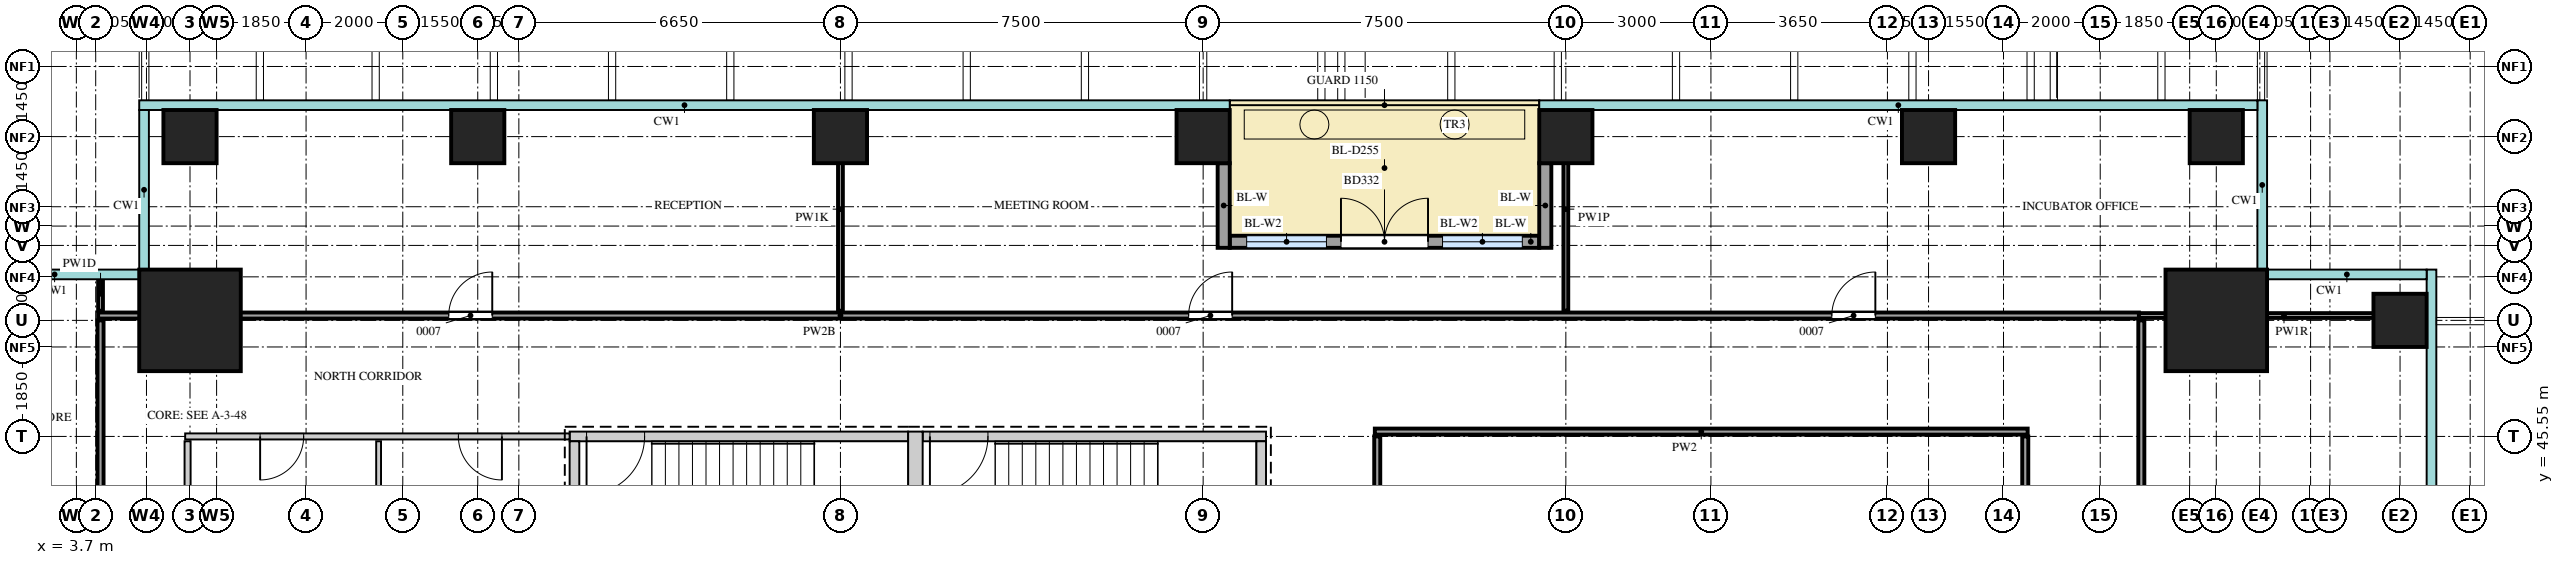
"""IFC4 building model, lengths in metres.
Left out: names, types, materials, properties, quantities, classifications, styles, units other than length and angle.
Written with IfcOpenShell. Run it as: python <this file> out.ifc"""

import sys

from ifc_helpers import new_model, si_unit, direction, frame, frame_2d, origin, origin_2d, place, context, subcontext, project, spatial, rectangle, extrude, source, transform, mapped, element, fill, save


model = new_model("IFC4")
c1 = context("Model", 3, precision=1e-05, world=origin(), true_north=direction((0.0, 1.0)))
c2 = subcontext(c1, "Body", "Model", "MODEL_VIEW")
j1 = project(units=[si_unit("LENGTHUNIT", "METRE"), si_unit("PLANEANGLEUNIT", "RADIAN")], contexts=[c1])
p1 = place(None, origin())
s1 = spatial("IfcSite", under=j1, at=p1, CompositionType="ELEMENT")
p2 = place(p1, origin())
s2 = spatial("IfcBuilding", under=s1, at=p2, CompositionType="ELEMENT")
p3 = place(p2, frame((0.0, 0.0, 154.3)))
s3 = spatial("IfcBuildingStorey", under=s2, at=p3, CompositionType="ELEMENT", Elevation=154.3)
m1 = source(origin(), c2, "Body", "SweptSolid", [
    extrude(rectangle(XDim=7.0, YDim=0.2, at=frame_2d((3.5, 0.0))), origin(), (0.0, 0.0, 1.0), 4.1),
])
p4 = place(p3, frame((13.9, 45.55, 0.0), z_axis=(0.0, 0.0, 1.0), x_axis=(1.0, 0.0, 0.0)))
e1 = element("IfcWall", 1, at=p4, inside=s3, PredefinedType="SHEAR", context=c2, shape_type="MappedRepresentation", body=[
    mapped(m1, transform((0.0, 0.0, 0.0))),
])
m2 = source(origin(), c2, "Body", "SweptSolid", [
    extrude(rectangle(XDim=1.2, YDim=2.1, at=frame_2d((0.6, 1.05))), frame((0.0, 0.11, 0.0), z_axis=(0.0, -1.0, 0.0), x_axis=(1.0, 0.0, 0.0)), (0.0, 0.0, 1.0), 0.22),
])
p5 = place(p4, frame((0.35, 0.0, 0.0)))
e2 = element("IfcOpeningElement", 2, at=p5, cuts=e1, PredefinedType="OPENING", context=c2, shape_type="MappedRepresentation", body=[
    mapped(m2, transform((0.0, 0.0, 0.0))),
])
m3 = source(origin(), c2, "Body", "SweptSolid", [
    extrude(rectangle(XDim=7.1, YDim=0.2, at=frame_2d((3.55, 0.0))), origin(), (0.0, 0.0, 1.0), 4.1),
])
p6 = place(p3, frame((21.2, 45.55, 0.0), z_axis=(0.0, 0.0, 1.0), x_axis=(1.0, 0.0, 0.0)))
e3 = element("IfcWall", 3, at=p6, inside=s3, PredefinedType="SHEAR", context=c2, shape_type="MappedRepresentation", body=[
    mapped(m3, transform((0.0, 0.0, 0.0))),
])
p7 = place(p6, frame((0.15, 0.0, 0.0)))
e4 = element("IfcOpeningElement", 4, at=p7, cuts=e3, PredefinedType="OPENING", context=c2, shape_type="MappedRepresentation", body=[
    mapped(m2, transform((0.0, 0.0, 0.0))),
])
m4 = source(origin(), c2, "Body", "SweptSolid", [
    extrude(rectangle(XDim=3.75, YDim=0.3, at=frame_2d((1.875, 0.0))), origin(), (0.0, 0.0, 1.0), 4.1),
])
p8 = place(p3, frame((21.05, 41.9, 0.0), z_axis=(0.0, 0.0, 1.0), x_axis=(0.0, 1.0, 0.0)))
e5 = element("IfcWall", 5, at=p8, inside=s3, PredefinedType="SHEAR", context=c2, shape_type="MappedRepresentation", body=[
    mapped(m4, transform((0.0, 0.0, 0.0))),
])
m5 = source(origin(), c2, "Body", "SweptSolid", [
    extrude(rectangle(XDim=3.35, YDim=0.2, at=frame_2d((1.675, 0.0))), origin(), (0.0, 0.0, 1.0), 4.1),
])
for number, where, z_axis, x_axis in (
    (6, (14.0, 42.1, 0.0), (0.0, 0.0, 1.0), (0.0, 1.0, 0.0)),
    (7, (28.2, 42.1, 0.0), (0.0, 0.0, 1.0), (0.0, 1.0, 0.0)),
):
    element("IfcWall", number, at=place(p3, frame(where, z_axis=z_axis, x_axis=x_axis)), inside=s3, PredefinedType="SHEAR", context=c2, shape_type="MappedRepresentation", body=[
        mapped(m5, transform((0.0, 0.0, 0.0))),
    ])
m6 = source(origin(), c2, "Body", "SweptSolid", [
    extrude(rectangle(XDim=2.1, YDim=2.1, at=origin_2d()), origin(), (0.0, 0.0, 1.0), 4.4),
])
for number, where, z_axis, x_axis in (
    (8, (47.95, 47.95, 0.0), (0.0, 0.0, 1.0), (1.0, 0.0, 0.0)),
    (9, (6.05, 47.95, 0.0), (0.0, 0.0, 1.0), (1.0, 0.0, 0.0)),
):
    element("IfcColumn", number, at=place(p3, frame(where, z_axis=z_axis, x_axis=x_axis)), inside=s3, PredefinedType="COLUMN", context=c2, shape_type="MappedRepresentation", body=[
        mapped(m6, transform((0.0, 0.0, 0.0))),
    ])
m7 = source(origin(), c2, "Body", "SweptSolid", [
    extrude(rectangle(XDim=1.1, YDim=1.1, at=origin_2d()), origin(), (0.0, 0.0, 1.0), 4.4),
])
for number, where, z_axis, x_axis in (
    (10, (51.75, 47.95, 0.0), (0.0, 0.0, 1.0), (1.0, 0.0, 0.0)),
    (11, (6.05, 51.75, 0.0), (0.0, 0.0, 1.0), (1.0, 0.0, 0.0)),
    (12, (12.0, 51.75, 0.0), (0.0, 0.0, 1.0), (1.0, 0.0, 0.0)),
    (13, (19.5, 51.75, 0.0), (0.0, 0.0, 1.0), (1.0, 0.0, 0.0)),
    (14, (27.0, 51.75, 0.0), (0.0, 0.0, 1.0), (1.0, 0.0, 0.0)),
    (15, (34.5, 51.75, 0.0), (0.0, 0.0, 1.0), (1.0, 0.0, 0.0)),
    (16, (42.0, 51.75, 0.0), (0.0, 0.0, 1.0), (1.0, 0.0, 0.0)),
    (17, (47.95, 51.75, 0.0), (0.0, 0.0, 1.0), (1.0, 0.0, 0.0)),
):
    element("IfcColumn", number, at=place(p3, frame(where, z_axis=z_axis, x_axis=x_axis)), inside=s3, PredefinedType="COLUMN", context=c2, shape_type="MappedRepresentation", body=[
        mapped(m7, transform((0.0, 0.0, 0.0))),
    ])
m8 = source(origin(), c2, "Body", "SweptSolid", [
    extrude(rectangle(XDim=6.4, YDim=0.25, at=frame_2d((3.2, 0.0))), origin(), (0.0, 0.0, 1.0), 4.1),
])
p9 = place(p3, frame((27.55, 49.575, 0.0), z_axis=(0.0, 0.0, 1.0), x_axis=(1.0, 0.0, 0.0)))
e18 = element("IfcWall", 18, at=p9, inside=s3, PredefinedType="SOLIDWALL", context=c2, shape_type="MappedRepresentation", body=[
    mapped(m8, transform((0.0, 0.0, 0.0))),
])
m9 = source(origin(), c2, "Body", "SweptSolid", [
    extrude(rectangle(XDim=1.65, YDim=2.4, at=frame_2d((0.825, 1.2))), frame((0.0, 0.135, 0.0), z_axis=(0.0, -1.0, 0.0), x_axis=(1.0, 0.0, 0.0)), (0.0, 0.0, 1.0), 0.27),
])
p10 = place(p9, frame((0.35, 0.0, 0.0)))
e19 = element("IfcOpeningElement", 19, at=p10, cuts=e18, PredefinedType="OPENING", context=c2, shape_type="MappedRepresentation", body=[
    mapped(m9, transform((0.0, 0.0, 0.0))),
])
p11 = place(p9, frame((4.4, 0.0, 0.0)))
e20 = element("IfcOpeningElement", 20, at=p11, cuts=e18, PredefinedType="OPENING", context=c2, shape_type="MappedRepresentation", body=[
    mapped(m9, transform((0.0, 0.0, 0.0))),
])
m10 = source(origin(), c2, "Body", "SweptSolid", [
    extrude(rectangle(XDim=1.8, YDim=2.4, at=frame_2d((0.9, 1.2))), frame((0.0, 0.135, 0.0), z_axis=(0.0, -1.0, 0.0), x_axis=(1.0, 0.0, 0.0)), (0.0, 0.0, 1.0), 0.27),
])
p12 = place(p9, frame((2.3, 0.0, 0.0)))
e21 = element("IfcOpeningElement", 21, at=p12, cuts=e18, PredefinedType="OPENING", context=c2, shape_type="MappedRepresentation", body=[
    mapped(m10, transform((0.0, 0.0, 0.0))),
])
m11 = source(origin(), c2, "Body", "SweptSolid", [
    extrude(rectangle(XDim=1.75, YDim=0.25, at=frame_2d((0.875, 0.0))), origin(), (0.0, 0.0, 1.0), 4.1),
])
for number, where, z_axis, x_axis in (
    (22, (27.425, 51.2, 0.0), (0.0, 0.0, 1.0), (0.0, -1.0, 0.0)),
    (23, (34.075, 51.2, 0.0), (0.0, 0.0, 1.0), (0.0, -1.0, 0.0)),
):
    element("IfcWall", number, at=place(p3, frame(where, z_axis=z_axis, x_axis=x_axis)), inside=s3, PredefinedType="SOLIDWALL", context=c2, shape_type="MappedRepresentation", body=[
        mapped(m11, transform((0.0, 0.0, 0.0))),
    ])
m12 = source(origin(), c2, "Body", "SweptSolid", [
    extrude(rectangle(XDim=37.65, YDim=0.125, at=frame_2d((18.825, 0.0))), origin(), (0.0, 0.0, 1.0), 4.2),
])
p13 = place(p3, frame((46.4, 10.3, 0.0), z_axis=(0.0, 0.0, 1.0), x_axis=(0.0, 1.0, 0.0)))
e24 = element("IfcWall", 24, at=p13, inside=s3, PredefinedType="PARTITIONING", context=c2, shape_type="MappedRepresentation", body=[
    mapped(m12, transform((0.0, 0.0, 0.0))),
])
m13 = source(origin(), c2, "Body", "SweptSolid", [
    extrude(rectangle(XDim=0.9, YDim=2.1, at=frame_2d((0.45, 1.05))), frame((0.0, 0.073, 0.0), z_axis=(0.0, -1.0, 0.0), x_axis=(1.0, 0.0, 0.0)), (0.0, 0.0, 1.0), 0.145),
])
p14 = place(p13, frame((7.85, 0.0, 0.0)))
e25 = element("IfcOpeningElement", 25, at=p14, cuts=e24, PredefinedType="OPENING", context=c2, shape_type="MappedRepresentation", body=[
    mapped(m13, transform((0.0, 0.0, 0.0))),
])
m14 = source(origin(), c2, "Body", "SweptSolid", [
    extrude(rectangle(XDim=1.2, YDim=2.1, at=frame_2d((0.6, 1.05))), frame((0.0, 0.073, 0.0), z_axis=(0.0, -1.0, 0.0), x_axis=(1.0, 0.0, 0.0)), (0.0, 0.0, 1.0), 0.145),
])
p15 = place(p13, frame((25.4, 0.0, 0.0)))
e26 = element("IfcOpeningElement", 26, at=p15, cuts=e24, PredefinedType="OPENING", context=c2, shape_type="MappedRepresentation", body=[
    mapped(m14, transform((0.0, 0.0, 0.0))),
])
m15 = source(origin(), c2, "Body", "SweptSolid", [
    extrude(rectangle(XDim=32.85, YDim=0.125, at=frame_2d((16.425, 0.0))), origin(), (0.0, 0.0, 1.0), 4.2),
])
p16 = place(p3, frame((44.0, 12.7, 0.0), z_axis=(0.0, 0.0, 1.0), x_axis=(0.0, 1.0, 0.0)))
e27 = element("IfcWall", 27, at=p16, inside=s3, PredefinedType="PARTITIONING", context=c2, shape_type="MappedRepresentation", body=[
    mapped(m15, transform((0.0, 0.0, 0.0))),
])
p17 = place(p16, frame((18.2, 0.0, 0.0)))
e28 = element("IfcOpeningElement", 28, at=p17, cuts=e27, PredefinedType="OPENING", context=c2, shape_type="MappedRepresentation", body=[
    mapped(m14, transform((0.0, 0.0, 0.0))),
])
p18 = place(p16, frame((27.5, 0.0, 0.0)))
e29 = element("IfcOpeningElement", 29, at=p18, cuts=e27, PredefinedType="OPENING", context=c2, shape_type="MappedRepresentation", body=[
    mapped(m14, transform((0.0, 0.0, 0.0))),
])
m16 = source(origin(), c2, "Body", "SweptSolid", [
    extrude(rectangle(XDim=28.75, YDim=0.125, at=frame_2d((14.375, 0.0))), origin(), (0.0, 0.0, 1.0), 4.2),
])
p19 = place(p3, frame((4.2, 19.2, 0.0), z_axis=(0.0, 0.0, 1.0), x_axis=(0.0, 1.0, 0.0)))
e30 = element("IfcWall", 30, at=p19, inside=s3, PredefinedType="PARTITIONING", context=c2, shape_type="MappedRepresentation", body=[
    mapped(m16, transform((0.0, 0.0, 0.0))),
])
p20 = place(p19, frame((5.95, 0.0, 0.0)))
e31 = element("IfcOpeningElement", 31, at=p20, cuts=e30, PredefinedType="OPENING", context=c2, shape_type="MappedRepresentation", body=[
    mapped(m13, transform((0.0, 0.0, 0.0))),
])
p21 = place(p19, frame((20.25, 0.0, 0.0)))
e32 = element("IfcOpeningElement", 32, at=p21, cuts=e30, PredefinedType="OPENING", context=c2, shape_type="MappedRepresentation", body=[
    mapped(m13, transform((0.0, 0.0, 0.0))),
])
m17 = source(origin(), c2, "Body", "SweptSolid", [
    extrude(rectangle(XDim=9.45, YDim=0.125, at=frame_2d((4.725, 0.0))), origin(), (0.0, 0.0, 1.0), 4.2),
])
p22 = place(p3, frame((30.6, 36.1, 0.0), z_axis=(0.0, 0.0, 1.0), x_axis=(0.0, 1.0, 0.0)))
e33 = element("IfcWall", 33, at=p22, inside=s3, PredefinedType="PARTITIONING", context=c2, shape_type="MappedRepresentation", body=[
    mapped(m17, transform((0.0, 0.0, 0.0))),
])
m18 = source(origin(), c2, "Body", "SweptSolid", [
    extrude(rectangle(XDim=3.45, YDim=0.125, at=frame_2d((1.725, 0.0))), origin(), (0.0, 0.0, 1.0), 4.2),
])
p23 = place(p3, frame((6.0, 42.0, 0.0), z_axis=(0.0, 0.0, 1.0), x_axis=(0.0, 1.0, 0.0)))
e34 = element("IfcWall", 34, at=p23, inside=s3, PredefinedType="PARTITIONING", context=c2, shape_type="MappedRepresentation", body=[
    mapped(m18, transform((0.0, 0.0, 0.0))),
])
m19 = source(origin(), c2, "Body", "SweptSolid", [
    extrude(rectangle(XDim=3.45, YDim=0.1, at=frame_2d((1.725, 0.0))), origin(), (0.0, 0.0, 1.0), 4.2),
])
p24 = place(p3, frame((9.95, 42.0, 0.0), z_axis=(0.0, 0.0, 1.0), x_axis=(0.0, 1.0, 0.0)))
e35 = element("IfcWall", 35, at=p24, inside=s3, PredefinedType="PARTITIONING", context=c2, shape_type="MappedRepresentation", body=[
    mapped(m19, transform((0.0, 0.0, 0.0))),
])
m20 = source(origin(), c2, "Body", "SweptSolid", [
    extrude(rectangle(XDim=7.95, YDim=0.125, at=frame_2d((3.975, 0.0))), origin(), (0.0, 0.0, 1.0), 4.2),
])
p25 = place(p3, frame((5.95, 45.55, 0.0), z_axis=(0.0, 0.0, 1.0), x_axis=(1.0, 0.0, 0.0)))
e36 = element("IfcWall", 36, at=p25, inside=s3, PredefinedType="PARTITIONING", context=c2, shape_type="MappedRepresentation", body=[
    mapped(m20, transform((0.0, 0.0, 0.0))),
])
p26 = place(p25, frame((1.55, 0.0, 0.0)))
e37 = element("IfcOpeningElement", 37, at=p26, cuts=e36, PredefinedType="OPENING", context=c2, shape_type="MappedRepresentation", body=[
    mapped(m13, transform((0.0, 0.0, 0.0))),
])
p27 = place(p25, frame((5.65, 0.0, 0.0)))
e38 = element("IfcOpeningElement", 38, at=p27, cuts=e36, PredefinedType="OPENING", context=c2, shape_type="MappedRepresentation", body=[
    mapped(m13, transform((0.0, 0.0, 0.0))),
])
m21 = source(origin(), c2, "Body", "SweptSolid", [
    extrude(rectangle(XDim=13.5, YDim=0.125, at=frame_2d((6.75, 0.0))), origin(), (0.0, 0.0, 1.0), 4.2),
])
p28 = place(p3, frame((30.55, 45.65, 0.0), z_axis=(0.0, 0.0, 1.0), x_axis=(1.0, 0.0, 0.0)))
e39 = element("IfcWall", 39, at=p28, inside=s3, PredefinedType="PARTITIONING", context=c2, shape_type="MappedRepresentation", body=[
    mapped(m21, transform((0.0, 0.0, 0.0))),
])
m22 = source(origin(), c2, "Body", "SweptSolid", [
    extrude(rectangle(XDim=42.2, YDim=0.125, at=frame_2d((21.1, 0.0))), origin(), (0.0, 0.0, 1.0), 3.4),
])
p29 = place(p3, frame((4.15, 48.05, 0.0), z_axis=(0.0, 0.0, 1.0), x_axis=(1.0, 0.0, 0.0)))
e40 = element("IfcWall", 40, at=p29, inside=s3, PredefinedType="PARTITIONING", context=c2, shape_type="MappedRepresentation", body=[
    mapped(m22, transform((0.0, 0.0, 0.0))),
])
p30 = place(p29, frame((7.25, 0.0, 0.0)))
e41 = element("IfcOpeningElement", 41, at=p30, cuts=e40, PredefinedType="OPENING", context=c2, shape_type="MappedRepresentation", body=[
    mapped(m13, transform((0.0, 0.0, 0.0))),
])
p31 = place(p29, frame((22.55, 0.0, 0.0)))
e42 = element("IfcOpeningElement", 42, at=p31, cuts=e40, PredefinedType="OPENING", context=c2, shape_type="MappedRepresentation", body=[
    mapped(m13, transform((0.0, 0.0, 0.0))),
])
p32 = place(p29, frame((35.85, 0.0, 0.0)))
e43 = element("IfcOpeningElement", 43, at=p32, cuts=e40, PredefinedType="OPENING", context=c2, shape_type="MappedRepresentation", body=[
    mapped(m13, transform((0.0, 0.0, 0.0))),
])
m23 = source(origin(), c2, "Body", "SweptSolid", [
    extrude(rectangle(XDim=6.0, YDim=0.1, at=frame_2d((3.0, 0.0))), origin(), (0.0, 0.0, 1.0), 3.4),
])
p33 = place(p3, frame((46.35, 48.05, 0.0), z_axis=(0.0, 0.0, 1.0), x_axis=(1.0, 0.0, 0.0)))
e44 = element("IfcWall", 44, at=p33, inside=s3, PredefinedType="PARTITIONING", context=c2, shape_type="MappedRepresentation", body=[
    mapped(m23, transform((0.0, 0.0, 0.0))),
])
m24 = source(origin(), c2, "Body", "SweptSolid", [
    extrude(rectangle(XDim=0.7, YDim=0.1, at=frame_2d((0.35, 0.0))), origin(), (0.0, 0.0, 1.0), 4.2),
])
p34 = place(p3, frame((4.2, 48.15, 0.0), z_axis=(0.0, 0.0, 1.0), x_axis=(0.0, 1.0, 0.0)))
e45 = element("IfcWall", 45, at=p34, inside=s3, PredefinedType="PARTITIONING", context=c2, shape_type="MappedRepresentation", body=[
    mapped(m24, transform((0.0, 0.0, 0.0))),
])
m25 = source(origin(), c2, "Body", "SweptSolid", [
    extrude(rectangle(XDim=4.2, YDim=0.1, at=frame_2d((2.1, 0.0))), origin(), (0.0, 0.0, 1.0), 3.62),
])
p35 = place(p3, frame((19.5, 48.15, 0.0), z_axis=(0.0, 0.0, 1.0), x_axis=(0.0, 1.0, 0.0)))
e46 = element("IfcWall", 46, at=p35, inside=s3, PredefinedType="PARTITIONING", context=c2, shape_type="MappedRepresentation", body=[
    mapped(m25, transform((0.0, 0.0, 0.0))),
])
m26 = source(origin(), c2, "Body", "SweptSolid", [
    extrude(rectangle(XDim=4.2, YDim=0.1, at=frame_2d((2.1, 0.0))), origin(), (0.0, 0.0, 1.0), 3.45),
])
p36 = place(p3, frame((34.5, 48.15, 0.0), z_axis=(0.0, 0.0, 1.0), x_axis=(0.0, 1.0, 0.0)))
e47 = element("IfcWall", 47, at=p36, inside=s3, PredefinedType="PARTITIONING", context=c2, shape_type="MappedRepresentation", body=[
    mapped(m26, transform((0.0, 0.0, 0.0))),
])
m27 = source(origin(), c2, "Body", "SweptSolid", [
    extrude(rectangle(XDim=1.65, YDim=2.4, at=frame_2d((0.825, 1.2))), frame((0.0, 0.03, 0.0), z_axis=(0.0, -1.0, 0.0), x_axis=(1.0, 0.0, 0.0)), (0.0, 0.0, 1.0), 0.06),
])
p37 = place(p10, origin())
e48 = element("IfcWindow", 48, at=p37, inside=s3, PartitioningType="SINGLE_PANEL", PredefinedType="WINDOW", context=c2, shape_type="MappedRepresentation", body=[
    mapped(m27, transform((0.0, 0.0, 0.0))),
])
fill(e19, e48)
p38 = place(p11, origin())
e49 = element("IfcWindow", 49, at=p38, inside=s3, PartitioningType="SINGLE_PANEL", PredefinedType="WINDOW", context=c2, shape_type="MappedRepresentation", body=[
    mapped(m27, transform((0.0, 0.0, 0.0))),
])
fill(e20, e49)
m28 = source(origin(), c2, "Body", "SweptSolid", [
    extrude(rectangle(XDim=1.8, YDim=2.4, at=frame_2d((0.9, 1.2))), frame((0.0, 0.025, 0.0), z_axis=(0.0, -1.0, 0.0), x_axis=(1.0, 0.0, 0.0)), (0.0, 0.0, 1.0), 0.05),
])
p39 = place(p12, origin())
e50 = element("IfcDoor", 50, at=p39, inside=s3, OperationType="DOUBLE_DOOR_DOUBLE_SWING", PredefinedType="DOOR", context=c2, shape_type="MappedRepresentation", body=[
    mapped(m28, transform((0.0, 0.0, 0.0))),
])
fill(e21, e50)
m29 = source(origin(), c2, "Body", "SweptSolid", [
    extrude(rectangle(XDim=0.9, YDim=2.1, at=frame_2d((0.45, 1.05))), frame((0.0, 0.025, 0.0), z_axis=(0.0, -1.0, 0.0), x_axis=(1.0, 0.0, 0.0)), (0.0, 0.0, 1.0), 0.05),
])
p40 = place(p30, origin())
e51 = element("IfcDoor", 51, at=p40, inside=s3, OperationType="SINGLE_SWING_LEFT", PredefinedType="DOOR", context=c2, shape_type="MappedRepresentation", body=[
    mapped(m29, transform((0.0, 0.0, 0.0))),
])
fill(e41, e51)
p41 = place(p31, origin())
e52 = element("IfcDoor", 52, at=p41, inside=s3, OperationType="SINGLE_SWING_LEFT", PredefinedType="DOOR", context=c2, shape_type="MappedRepresentation", body=[
    mapped(m29, transform((0.0, 0.0, 0.0))),
])
fill(e42, e52)
p42 = place(p32, origin())
e53 = element("IfcDoor", 53, at=p42, inside=s3, OperationType="SINGLE_SWING_LEFT", PredefinedType="DOOR", context=c2, shape_type="MappedRepresentation", body=[
    mapped(m29, transform((0.0, 0.0, 0.0))),
])
fill(e43, e53)
p43 = place(p26, origin())
e54 = element("IfcDoor", 54, at=p43, inside=s3, OperationType="SINGLE_SWING_LEFT", PredefinedType="DOOR", context=c2, shape_type="MappedRepresentation", body=[
    mapped(m29, transform((0.0, 0.0, 0.0))),
])
fill(e37, e54)
p44 = place(p27, origin())
e55 = element("IfcDoor", 55, at=p44, inside=s3, OperationType="SINGLE_SWING_RIGHT", PredefinedType="DOOR", context=c2, shape_type="MappedRepresentation", body=[
    mapped(m29, transform((0.0, 0.0, 0.0))),
])
fill(e38, e55)
m30 = source(origin(), c2, "Body", "SweptSolid", [
    extrude(rectangle(XDim=1.2, YDim=2.1, at=frame_2d((0.6, 1.05))), frame((0.0, 0.025, 0.0), z_axis=(0.0, -1.0, 0.0), x_axis=(1.0, 0.0, 0.0)), (0.0, 0.0, 1.0), 0.05),
])
p45 = place(p5, origin())
e56 = element("IfcDoor", 56, at=p45, inside=s3, OperationType="SINGLE_SWING_LEFT", PredefinedType="DOOR", context=c2, shape_type="MappedRepresentation", body=[
    mapped(m30, transform((0.0, 0.0, 0.0))),
])
fill(e2, e56)
p46 = place(p7, origin())
e57 = element("IfcDoor", 57, at=p46, inside=s3, OperationType="SINGLE_SWING_LEFT", PredefinedType="DOOR", context=c2, shape_type="MappedRepresentation", body=[
    mapped(m30, transform((0.0, 0.0, 0.0))),
])
fill(e4, e57)
save(model, sys.argv[1])
